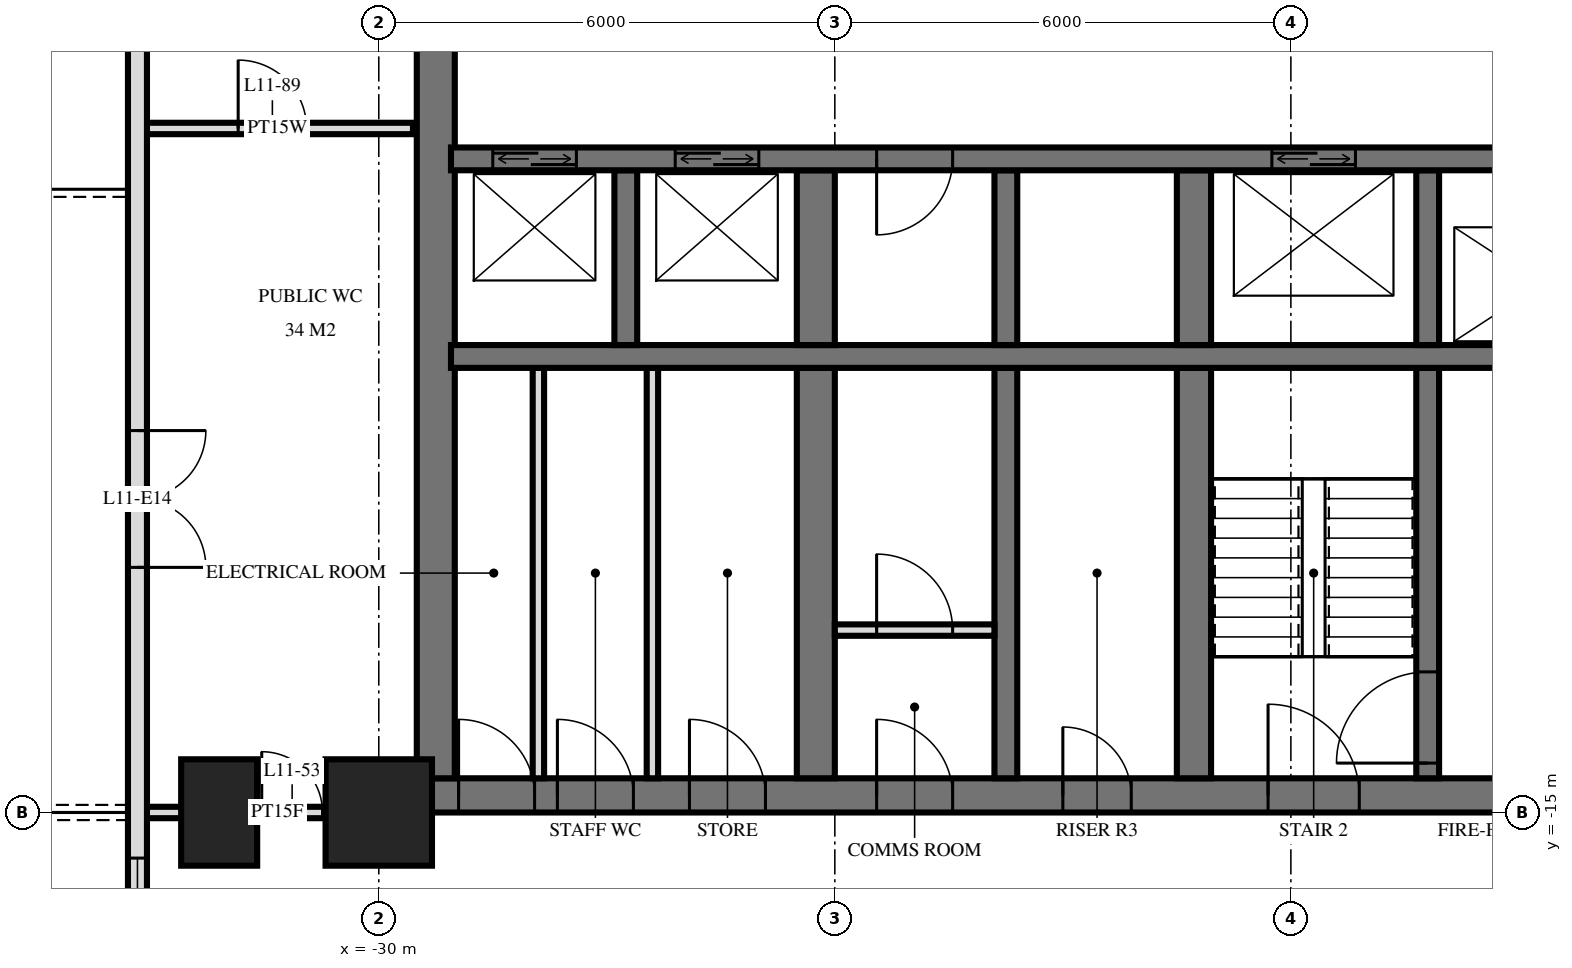
"""IFC4 building model, lengths in metres.
Left out: names, types, materials, properties, quantities, classifications, styles, units other than length and angle.
Written with IfcOpenShell. Run it as: python <this file> out.ifc"""

import sys

from ifc_helpers import new_model, si_unit, direction, frame, frame_2d, origin, origin_2d, place, context, subcontext, project, spatial, rectangle, extrude, element, fill, save


model = new_model("IFC4")
c1 = context("Model", 3, precision=1e-05, world=origin(), true_north=direction((0.0, 1.0)))
c2 = subcontext(c1, "Body", "Model", "MODEL_VIEW")
j1 = project(units=[si_unit("LENGTHUNIT", "METRE"), si_unit("PLANEANGLEUNIT", "RADIAN")], contexts=[c1])
p1 = place(None, origin())
s1 = spatial("IfcSite", under=j1, at=p1, CompositionType="ELEMENT")
p2 = place(p1, origin())
s2 = spatial("IfcBuilding", under=s1, at=p2, CompositionType="ELEMENT")
p3 = place(p2, frame((0.0, 0.0, 49.2)))
s3 = spatial("IfcBuildingStorey", under=s2, at=p3, CompositionType="ELEMENT", Elevation=49.2)
p4 = place(p3, frame((-32.1, -15.0, 0.0), z_axis=(0.0, 0.0, 1.0), x_axis=(0.0, 1.0, 0.0)))
e1 = element("IfcColumn", 1, at=p4, inside=s3, PredefinedType="COLUMN", context=c2, shape_type="SweptSolid", body=[
    extrude(rectangle(XDim=1.4, YDim=1.0, at=origin_2d()), origin(), (0.0, 0.0, 1.0), 3.6),
])
p5 = place(p3, frame((-30.0, -15.0, 0.0), z_axis=(0.0, 0.0, 1.0), x_axis=(1.0, 0.0, 0.0)))
e2 = element("IfcColumn", 2, at=p5, inside=s3, PredefinedType="COLUMN", context=c2, shape_type="SweptSolid", body=[
    extrude(rectangle(XDim=1.4, YDim=1.4, at=origin_2d()), origin(), (0.0, 0.0, 1.0), 3.6),
])
p6 = place(p3, frame((-29.5, -14.775, 0.0), z_axis=(0.0, 0.0, 1.0), x_axis=(1.0, 0.0, 0.0)))
e3 = element("IfcWall", 3, at=p6, inside=s3, PredefinedType="SHEAR", context=c2, shape_type="SweptSolid", body=[
    extrude(rectangle(XDim=19.5, YDim=0.45, at=frame_2d((9.75, 0.0))), origin(), (0.0, 0.0, 1.0), 3.6),
])
p7 = place(p6, frame((11.2, 0.0, 0.0)))
e4 = element("IfcOpeningElement", 4, at=p7, cuts=e3, PredefinedType="OPENING", context=c2, shape_type="SweptSolid", body=[
    extrude(rectangle(XDim=1.2, YDim=2.1, at=frame_2d((0.6, 1.05))), frame((0.0, 0.235, 0.0), z_axis=(0.0, -1.0, 0.0), x_axis=(1.0, 0.0, 0.0)), (0.0, 0.0, 1.0), 0.47),
])
p8 = place(p6, frame((14.25, 0.0, 0.0)))
e5 = element("IfcOpeningElement", 5, at=p8, cuts=e3, PredefinedType="OPENING", context=c2, shape_type="SweptSolid", body=[
    extrude(rectangle(XDim=1.1, YDim=2.1, at=frame_2d((0.55, 1.05))), frame((0.0, 0.235, 0.0), z_axis=(0.0, -1.0, 0.0), x_axis=(1.0, 0.0, 0.0)), (0.0, 0.0, 1.0), 0.47),
])
p9 = place(p6, frame((8.5, 0.0, 0.0)))
e6 = element("IfcOpeningElement", 6, at=p9, cuts=e3, PredefinedType="OPENING", context=c2, shape_type="SweptSolid", body=[
    extrude(rectangle(XDim=0.9, YDim=2.1, at=frame_2d((0.45, 1.05))), frame((0.0, 0.235, 0.0), z_axis=(0.0, -1.0, 0.0), x_axis=(1.0, 0.0, 0.0)), (0.0, 0.0, 1.0), 0.47),
])
p10 = place(p6, frame((6.05, 0.0, 0.0)))
e7 = element("IfcOpeningElement", 7, at=p10, cuts=e3, PredefinedType="OPENING", context=c2, shape_type="SweptSolid", body=[
    extrude(rectangle(XDim=1.0, YDim=2.1, at=frame_2d((0.5, 1.05))), frame((0.0, 0.235, 0.0), z_axis=(0.0, -1.0, 0.0), x_axis=(1.0, 0.0, 0.0)), (0.0, 0.0, 1.0), 0.47),
])
p11 = place(p6, frame((3.587, 0.0, 0.0)))
e8 = element("IfcOpeningElement", 8, at=p11, cuts=e3, PredefinedType="OPENING", context=c2, shape_type="SweptSolid", body=[
    extrude(rectangle(XDim=1.0, YDim=2.1, at=frame_2d((0.5, 1.05))), frame((0.0, 0.235, 0.0), z_axis=(0.0, -1.0, 0.0), x_axis=(1.0, 0.0, 0.0)), (0.0, 0.0, 1.0), 0.47),
])
p12 = place(p6, frame((1.85, 0.0, 0.0)))
e9 = element("IfcOpeningElement", 9, at=p12, cuts=e3, PredefinedType="OPENING", context=c2, shape_type="SweptSolid", body=[
    extrude(rectangle(XDim=1.0, YDim=2.1, at=frame_2d((0.5, 1.05))), frame((0.0, 0.235, 0.0), z_axis=(0.0, -1.0, 0.0), x_axis=(1.0, 0.0, 0.0)), (0.0, 0.0, 1.0), 0.47),
])
p13 = place(p6, frame((0.55, 0.0, 0.0)))
e10 = element("IfcOpeningElement", 10, at=p13, cuts=e3, PredefinedType="OPENING", context=c2, shape_type="SweptSolid", body=[
    extrude(rectangle(XDim=1.0, YDim=2.1, at=frame_2d((0.5, 1.05))), frame((0.0, 0.235, 0.0), z_axis=(0.0, -1.0, 0.0), x_axis=(1.0, 0.0, 0.0)), (0.0, 0.0, 1.0), 0.47),
])
p14 = place(p3, frame((-29.25, -14.55, 0.0), z_axis=(0.0, 0.0, 1.0), x_axis=(0.0, 1.0, 0.0)))
e11 = element("IfcWall", 11, at=p14, inside=s3, PredefinedType="SHEAR", context=c2, shape_type="SweptSolid", body=[
    extrude(rectangle(XDim=14.1, YDim=0.5, at=frame_2d((7.05, 0.0))), origin(), (0.0, 0.0, 1.0), 3.6),
])
p15 = place(p3, frame((-29.05, -6.4, 0.0), z_axis=(0.0, 0.0, 1.0), x_axis=(1.0, 0.0, 0.0)))
e12 = element("IfcWall", 12, at=p15, inside=s3, PredefinedType="SHEAR", context=c2, shape_type="SweptSolid", body=[
    extrude(rectangle(XDim=18.7, YDim=0.3, at=frame_2d((9.35, 0.0))), origin(), (0.0, 0.0, 1.0), 3.6),
])
p16 = place(p15, frame((2.95, 0.0, 0.0)))
e13 = element("IfcOpeningElement", 13, at=p16, cuts=e12, PredefinedType="OPENING", context=c2, shape_type="SweptSolid", body=[
    extrude(rectangle(XDim=1.1, YDim=2.1, at=frame_2d((0.55, 1.05))), frame((0.0, 0.16, 0.0), z_axis=(0.0, -1.0, 0.0), x_axis=(1.0, 0.0, 0.0)), (0.0, 0.0, 1.0), 0.32),
])
p17 = place(p15, frame((0.55, 0.0, 0.0)))
e14 = element("IfcOpeningElement", 14, at=p17, cuts=e12, PredefinedType="OPENING", context=c2, shape_type="SweptSolid", body=[
    extrude(rectangle(XDim=1.1, YDim=2.1, at=frame_2d((0.55, 1.05))), frame((0.0, 0.16, 0.0), z_axis=(0.0, -1.0, 0.0), x_axis=(1.0, 0.0, 0.0)), (0.0, 0.0, 1.0), 0.32),
])
p18 = place(p15, frame((10.8, 0.0, 0.0)))
e15 = element("IfcOpeningElement", 15, at=p18, cuts=e12, PredefinedType="OPENING", context=c2, shape_type="SweptSolid", body=[
    extrude(rectangle(XDim=1.1, YDim=2.1, at=frame_2d((0.55, 1.05))), frame((0.0, 0.16, 0.0), z_axis=(0.0, -1.0, 0.0), x_axis=(1.0, 0.0, 0.0)), (0.0, 0.0, 1.0), 0.32),
])
p19 = place(p15, frame((5.6, 0.0, 0.0)))
e16 = element("IfcOpeningElement", 16, at=p19, cuts=e12, PredefinedType="OPENING", context=c2, shape_type="SweptSolid", body=[
    extrude(rectangle(XDim=1.0, YDim=2.1, at=frame_2d((0.5, 1.05))), frame((0.0, 0.16, 0.0), z_axis=(0.0, -1.0, 0.0), x_axis=(1.0, 0.0, 0.0)), (0.0, 0.0, 1.0), 0.32),
])
p20 = place(p3, frame((-29.05, -9.0, 0.0), z_axis=(0.0, 0.0, 1.0), x_axis=(1.0, 0.0, 0.0)))
e17 = element("IfcWall", 17, at=p20, inside=s3, PredefinedType="SHEAR", context=c2, shape_type="SweptSolid", body=[
    extrude(rectangle(XDim=18.7, YDim=0.3, at=frame_2d((9.35, 0.0))), origin(), (0.0, 0.0, 1.0), 3.6),
])
p21 = place(p20, frame((13.8, 0.0, 0.0)))
e18 = element("IfcOpeningElement", 18, at=p21, cuts=e17, PredefinedType="OPENING", context=c2, shape_type="SweptSolid", body=[
    extrude(rectangle(XDim=1.1, YDim=2.1, at=frame_2d((0.55, 1.05))), frame((0.0, 0.16, 0.0), z_axis=(0.0, -1.0, 0.0), x_axis=(1.0, 0.0, 0.0)), (0.0, 0.0, 1.0), 0.32),
])
p22 = place(p3, frame((-16.2, -8.85, 0.0), z_axis=(0.0, 0.0, 1.0), x_axis=(0.0, 1.0, 0.0)))
e19 = element("IfcWall", 19, at=p22, inside=s3, PredefinedType="SHEAR", context=c2, shape_type="SweptSolid", body=[
    extrude(rectangle(XDim=2.3, YDim=0.3, at=frame_2d((1.15, 0.0))), origin(), (0.0, 0.0, 1.0), 3.6),
])
p23 = place(p3, frame((-16.2, -14.55, 0.0), z_axis=(0.0, 0.0, 1.0), x_axis=(0.0, 1.0, 0.0)))
e20 = element("IfcWall", 20, at=p23, inside=s3, PredefinedType="SHEAR", context=c2, shape_type="SweptSolid", body=[
    extrude(rectangle(XDim=5.4, YDim=0.3, at=frame_2d((2.7, 0.0))), origin(), (0.0, 0.0, 1.0), 3.6),
])
p24 = place(p23, frame((0.2, 0.0, 0.0)))
e21 = element("IfcOpeningElement", 21, at=p24, cuts=e20, PredefinedType="OPENING", context=c2, shape_type="SweptSolid", body=[
    extrude(rectangle(XDim=1.2, YDim=2.1, at=frame_2d((0.6, 1.05))), frame((0.0, 0.16, 0.0), z_axis=(0.0, -1.0, 0.0), x_axis=(1.0, 0.0, 0.0)), (0.0, 0.0, 1.0), 0.32),
])
p25 = place(p3, frame((-19.275, -8.85, 0.0), z_axis=(0.0, 0.0, 1.0), x_axis=(0.0, 1.0, 0.0)))
e22 = element("IfcWall", 22, at=p25, inside=s3, PredefinedType="SHEAR", context=c2, shape_type="SweptSolid", body=[
    extrude(rectangle(XDim=2.3, YDim=0.45, at=frame_2d((1.15, 0.0))), origin(), (0.0, 0.0, 1.0), 3.6),
])
p26 = place(p3, frame((-19.275, -14.55, 0.0), z_axis=(0.0, 0.0, 1.0), x_axis=(0.0, 1.0, 0.0)))
e23 = element("IfcWall", 23, at=p26, inside=s3, PredefinedType="SHEAR", context=c2, shape_type="SweptSolid", body=[
    extrude(rectangle(XDim=5.4, YDim=0.45, at=frame_2d((2.7, 0.0))), origin(), (0.0, 0.0, 1.0), 3.6),
])
p27 = place(p3, frame((-21.75, -8.85, 0.0), z_axis=(0.0, 0.0, 1.0), x_axis=(0.0, 1.0, 0.0)))
e24 = element("IfcWall", 24, at=p27, inside=s3, PredefinedType="SHEAR", context=c2, shape_type="SweptSolid", body=[
    extrude(rectangle(XDim=2.3, YDim=0.3, at=frame_2d((1.15, 0.0))), origin(), (0.0, 0.0, 1.0), 3.6),
])
p28 = place(p3, frame((-21.75, -14.55, 0.0), z_axis=(0.0, 0.0, 1.0), x_axis=(0.0, 1.0, 0.0)))
e25 = element("IfcWall", 25, at=p28, inside=s3, PredefinedType="SHEAR", context=c2, shape_type="SweptSolid", body=[
    extrude(rectangle(XDim=5.4, YDim=0.3, at=frame_2d((2.7, 0.0))), origin(), (0.0, 0.0, 1.0), 3.6),
])
p29 = place(p3, frame((-24.25, -8.85, 0.0), z_axis=(0.0, 0.0, 1.0), x_axis=(0.0, 1.0, 0.0)))
e26 = element("IfcWall", 26, at=p29, inside=s3, PredefinedType="SHEAR", context=c2, shape_type="SweptSolid", body=[
    extrude(rectangle(XDim=2.3, YDim=0.5, at=frame_2d((1.15, 0.0))), origin(), (0.0, 0.0, 1.0), 3.6),
])
p30 = place(p3, frame((-24.25, -14.55, 0.0), z_axis=(0.0, 0.0, 1.0), x_axis=(0.0, 1.0, 0.0)))
e27 = element("IfcWall", 27, at=p30, inside=s3, PredefinedType="SHEAR", context=c2, shape_type="SweptSolid", body=[
    extrude(rectangle(XDim=5.4, YDim=0.5, at=frame_2d((2.7, 0.0))), origin(), (0.0, 0.0, 1.0), 3.6),
])
p31 = place(p3, frame((-26.75, -8.85, 0.0), z_axis=(0.0, 0.0, 1.0), x_axis=(0.0, 1.0, 0.0)))
e28 = element("IfcWall", 28, at=p31, inside=s3, PredefinedType="SHEAR", context=c2, shape_type="SweptSolid", body=[
    extrude(rectangle(XDim=2.3, YDim=0.3, at=frame_2d((1.15, 0.0))), origin(), (0.0, 0.0, 1.0), 3.6),
])
p32 = place(p3, frame((-33.175, -3.325, 0.0), z_axis=(0.0, 0.0, 1.0), x_axis=(0.0, -1.0, 0.0)))
e29 = element("IfcWall", 29, at=p32, inside=s3, PredefinedType="SOLIDWALL", context=c2, shape_type="SweptSolid", body=[
    extrude(rectangle(XDim=21.551, YDim=0.25, at=frame_2d((10.775, 0.0))), origin(), (0.0, 0.0, 1.0), 3.32),
])
p33 = place(p32, frame((6.65, 0.0, 0.0)))
e30 = element("IfcOpeningElement", 30, at=p33, cuts=e29, PredefinedType="OPENING", context=c2, shape_type="SweptSolid", body=[
    extrude(rectangle(XDim=1.8, YDim=2.4, at=frame_2d((0.9, 1.2))), frame((0.0, 0.135, 0.0), z_axis=(0.0, -1.0, 0.0), x_axis=(1.0, 0.0, 0.0)), (0.0, 0.0, 1.0), 0.27),
])
p34 = place(p32, frame((12.275, 0.0, 0.3)))
e31 = element("IfcOpeningElement", 31, at=p34, cuts=e29, PredefinedType="OPENING", context=c2, shape_type="SweptSolid", body=[
    extrude(rectangle(XDim=1.2, YDim=2.1, at=frame_2d((0.6, 1.05))), frame((0.0, 0.135, 0.0), z_axis=(0.0, -1.0, 0.0), x_axis=(1.0, 0.0, 0.0)), (0.0, 0.0, 1.0), 0.27),
])
p35 = place(p32, frame((14.675, 0.0, 0.0)))
e32 = element("IfcOpeningElement", 32, at=p35, cuts=e29, PredefinedType="OPENING", context=c2, shape_type="SweptSolid", body=[
    extrude(rectangle(XDim=1.8, YDim=2.4, at=frame_2d((0.9, 1.2))), frame((0.0, 0.135, 0.0), z_axis=(0.0, -1.0, 0.0), x_axis=(1.0, 0.0, 0.0)), (0.0, 0.0, 1.0), 0.27),
])
p36 = place(p32, frame((18.875, 0.0, 0.0)))
e33 = element("IfcOpeningElement", 33, at=p36, cuts=e29, PredefinedType="OPENING", context=c2, shape_type="SweptSolid", body=[
    extrude(rectangle(XDim=1.8, YDim=2.4, at=frame_2d((0.9, 1.2))), frame((0.0, 0.135, 0.0), z_axis=(0.0, -1.0, 0.0), x_axis=(1.0, 0.0, 0.0)), (0.0, 0.0, 1.0), 0.27),
])
p37 = place(p3, frame((-24.0, -12.6, 0.0), z_axis=(0.0, 0.0, 1.0), x_axis=(1.0, 0.0, 0.0)))
e34 = element("IfcWall", 34, at=p37, inside=s3, PredefinedType="PARTITIONING", context=c2, shape_type="SweptSolid", body=[
    extrude(rectangle(XDim=2.1, YDim=0.15, at=frame_2d((1.05, 0.0))), origin(), (0.0, 0.0, 1.0), 3.3),
])
p38 = place(p37, frame((0.55, 0.0, 0.0)))
e35 = element("IfcOpeningElement", 35, at=p38, cuts=e34, PredefinedType="OPENING", context=c2, shape_type="SweptSolid", body=[
    extrude(rectangle(XDim=1.0, YDim=2.1, at=frame_2d((0.5, 1.05))), frame((0.0, 0.085, 0.0), z_axis=(0.0, -1.0, 0.0), x_axis=(1.0, 0.0, 0.0)), (0.0, 0.0, 1.0), 0.17),
])
for number, where, z_axis, x_axis in (
    (36, (-26.4, -14.55, 0.0), (0.0, 0.0, 1.0), (0.0, 1.0, 0.0)),
    (37, (-27.9, -14.55, 0.0), (0.0, 0.0, 1.0), (0.0, 1.0, 0.0)),
):
    element("IfcWall", number, at=place(p3, frame(where, z_axis=z_axis, x_axis=x_axis)), inside=s3, PredefinedType="PARTITIONING", context=c2, shape_type="SweptSolid", body=[
        extrude(rectangle(XDim=5.4, YDim=0.15, at=frame_2d((2.7, 0.0))), origin(), (0.0, 0.0, 1.0), 3.3),
    ])
p39 = place(p3, frame((-33.12, -15.0, 0.0), z_axis=(0.0, 0.0, 1.0), x_axis=(1.0, 0.0, 0.0)))
e38 = element("IfcWall", 38, at=p39, inside=s3, PredefinedType="PARTITIONING", context=c2, shape_type="SweptSolid", body=[
    extrude(rectangle(XDim=3.57, YDim=0.15, at=frame_2d((1.785, 0.0))), origin(), (0.0, 0.0, 1.0), 3.32),
])
p40 = place(p39, frame((1.58, 0.0, 0.0)))
e39 = element("IfcOpeningElement", 39, at=p40, cuts=e38, PredefinedType="OPENING", context=c2, shape_type="SweptSolid", body=[
    extrude(rectangle(XDim=0.8, YDim=2.1, at=frame_2d((0.4, 1.05))), frame((0.0, 0.085, 0.0), z_axis=(0.0, -1.0, 0.0), x_axis=(1.0, 0.0, 0.0)), (0.0, 0.0, 1.0), 0.17),
])
p41 = place(p3, frame((-33.12, -6.0, 0.0), z_axis=(0.0, 0.0, 1.0), x_axis=(1.0, 0.0, 0.0)))
e40 = element("IfcWall", 40, at=p41, inside=s3, PredefinedType="PLUMBINGWALL", context=c2, shape_type="SweptSolid", body=[
    extrude(rectangle(XDim=3.57, YDim=0.15, at=frame_2d((1.785, 0.0))), origin(), (0.0, 0.0, 1.0), 3.32),
])
p42 = place(p41, frame((1.27, 0.0, 0.0)))
e41 = element("IfcOpeningElement", 41, at=p42, cuts=e40, PredefinedType="OPENING", context=c2, shape_type="SweptSolid", body=[
    extrude(rectangle(XDim=0.9, YDim=2.1, at=frame_2d((0.45, 1.05))), frame((0.0, 0.085, 0.0), z_axis=(0.0, -1.0, 0.0), x_axis=(1.0, 0.0, 0.0)), (0.0, 0.0, 1.0), 0.17),
])
p43 = place(p33, origin())
e42 = element("IfcDoor", 42, at=p43, inside=s3, OperationType="DOUBLE_DOOR_SINGLE_SWING", PredefinedType="DOOR", context=c2, shape_type="SweptSolid", body=[
    extrude(rectangle(XDim=1.8, YDim=2.4, at=frame_2d((0.9, 1.2))), frame((0.0, 0.025, 0.0), z_axis=(0.0, -1.0, 0.0), x_axis=(1.0, 0.0, 0.0)), (0.0, 0.0, 1.0), 0.05),
])
fill(e30, e42)
p44 = place(p34, origin())
e43 = element("IfcWindow", 43, at=p44, inside=s3, PartitioningType="SINGLE_PANEL", PredefinedType="WINDOW", context=c2, shape_type="SweptSolid", body=[
    extrude(rectangle(XDim=1.2, YDim=2.1, at=frame_2d((0.6, 1.05))), frame((0.0, 0.03, 0.0), z_axis=(0.0, -1.0, 0.0), x_axis=(1.0, 0.0, 0.0)), (0.0, 0.0, 1.0), 0.06),
])
fill(e31, e43)
p45 = place(p16, origin())
e44 = element("IfcDoor", 44, at=p45, inside=s3, OperationType="DOUBLE_DOOR_SLIDING", PredefinedType="USERDEFINED", context=c2, shape_type="SweptSolid", body=[
    extrude(rectangle(XDim=1.1, YDim=2.1, at=frame_2d((0.55, 1.05))), frame((0.0, 0.025, 0.0), z_axis=(0.0, -1.0, 0.0), x_axis=(1.0, 0.0, 0.0)), (0.0, 0.0, 1.0), 0.05),
])
fill(e13, e44)
p46 = place(p17, origin())
e45 = element("IfcDoor", 45, at=p46, inside=s3, OperationType="DOUBLE_DOOR_SLIDING", PredefinedType="USERDEFINED", context=c2, shape_type="SweptSolid", body=[
    extrude(rectangle(XDim=1.1, YDim=2.1, at=frame_2d((0.55, 1.05))), frame((0.0, 0.025, 0.0), z_axis=(0.0, -1.0, 0.0), x_axis=(1.0, 0.0, 0.0)), (0.0, 0.0, 1.0), 0.05),
])
fill(e14, e45)
p47 = place(p18, origin())
e46 = element("IfcDoor", 46, at=p47, inside=s3, OperationType="DOUBLE_DOOR_SLIDING", PredefinedType="USERDEFINED", context=c2, shape_type="SweptSolid", body=[
    extrude(rectangle(XDim=1.1, YDim=2.1, at=frame_2d((0.55, 1.05))), frame((0.0, 0.025, 0.0), z_axis=(0.0, -1.0, 0.0), x_axis=(1.0, 0.0, 0.0)), (0.0, 0.0, 1.0), 0.05),
])
fill(e15, e46)
p48 = place(p7, origin())
e47 = element("IfcDoor", 47, at=p48, inside=s3, OperationType="SINGLE_SWING_RIGHT", PredefinedType="DOOR", context=c2, shape_type="SweptSolid", body=[
    extrude(rectangle(XDim=1.2, YDim=2.1, at=frame_2d((0.6, 1.05))), frame((0.0, 0.025, 0.0), z_axis=(0.0, -1.0, 0.0), x_axis=(1.0, 0.0, 0.0)), (0.0, 0.0, 1.0), 0.05),
])
fill(e4, e47)
p49 = place(p9, origin())
e48 = element("IfcDoor", 48, at=p49, inside=s3, OperationType="SINGLE_SWING_RIGHT", PredefinedType="DOOR", context=c2, shape_type="SweptSolid", body=[
    extrude(rectangle(XDim=0.9, YDim=2.1, at=frame_2d((0.45, 1.05))), frame((0.0, 0.025, 0.0), z_axis=(0.0, -1.0, 0.0), x_axis=(1.0, 0.0, 0.0)), (0.0, 0.0, 1.0), 0.05),
])
fill(e6, e48)
p50 = place(p10, origin())
e49 = element("IfcDoor", 49, at=p50, inside=s3, OperationType="SINGLE_SWING_RIGHT", PredefinedType="DOOR", context=c2, shape_type="SweptSolid", body=[
    extrude(rectangle(XDim=1.0, YDim=2.1, at=frame_2d((0.5, 1.05))), frame((0.0, 0.025, 0.0), z_axis=(0.0, -1.0, 0.0), x_axis=(1.0, 0.0, 0.0)), (0.0, 0.0, 1.0), 0.05),
])
fill(e7, e49)
p51 = place(p11, origin())
e50 = element("IfcDoor", 50, at=p51, inside=s3, OperationType="SINGLE_SWING_RIGHT", PredefinedType="DOOR", context=c2, shape_type="SweptSolid", body=[
    extrude(rectangle(XDim=1.0, YDim=2.1, at=frame_2d((0.5, 1.05))), frame((0.0, 0.025, 0.0), z_axis=(0.0, -1.0, 0.0), x_axis=(1.0, 0.0, 0.0)), (0.0, 0.0, 1.0), 0.05),
])
fill(e8, e50)
p52 = place(p12, origin())
e51 = element("IfcDoor", 51, at=p52, inside=s3, OperationType="SINGLE_SWING_RIGHT", PredefinedType="DOOR", context=c2, shape_type="SweptSolid", body=[
    extrude(rectangle(XDim=1.0, YDim=2.1, at=frame_2d((0.5, 1.05))), frame((0.0, 0.025, 0.0), z_axis=(0.0, -1.0, 0.0), x_axis=(1.0, 0.0, 0.0)), (0.0, 0.0, 1.0), 0.05),
])
fill(e9, e51)
p53 = place(p13, origin())
e52 = element("IfcDoor", 52, at=p53, inside=s3, OperationType="SINGLE_SWING_RIGHT", PredefinedType="DOOR", context=c2, shape_type="SweptSolid", body=[
    extrude(rectangle(XDim=1.0, YDim=2.1, at=frame_2d((0.5, 1.05))), frame((0.0, 0.025, 0.0), z_axis=(0.0, -1.0, 0.0), x_axis=(1.0, 0.0, 0.0)), (0.0, 0.0, 1.0), 0.05),
])
fill(e10, e52)
p54 = place(p19, frame((0.5, 0.0, 0.0), z_axis=(0.0, 0.0, 1.0), x_axis=(-1.0, 0.0, 0.0)))
e53 = element("IfcDoor", 53, at=p54, inside=s3, OperationType="SINGLE_SWING_LEFT", PredefinedType="DOOR", context=c2, shape_type="SweptSolid", body=[
    extrude(rectangle(XDim=1.0, YDim=2.1, at=frame_2d((0.0, 1.05))), frame((0.0, -0.025, 0.0), z_axis=(0.0, 1.0, 0.0), x_axis=(-1.0, 0.0, 0.0)), (0.0, 0.0, 1.0), 0.05),
])
fill(e16, e53)
p55 = place(p24, origin())
e54 = element("IfcDoor", 54, at=p55, inside=s3, OperationType="SINGLE_SWING_RIGHT", PredefinedType="DOOR", context=c2, shape_type="SweptSolid", body=[
    extrude(rectangle(XDim=1.2, YDim=2.1, at=frame_2d((0.6, 1.05))), frame((0.0, 0.025, 0.0), z_axis=(0.0, -1.0, 0.0), x_axis=(1.0, 0.0, 0.0)), (0.0, 0.0, 1.0), 0.05),
])
fill(e21, e54)
p56 = place(p38, origin())
e55 = element("IfcDoor", 55, at=p56, inside=s3, OperationType="SINGLE_SWING_RIGHT", PredefinedType="DOOR", context=c2, shape_type="SweptSolid", body=[
    extrude(rectangle(XDim=1.0, YDim=2.1, at=frame_2d((0.5, 1.05))), frame((0.0, 0.025, 0.0), z_axis=(0.0, -1.0, 0.0), x_axis=(1.0, 0.0, 0.0)), (0.0, 0.0, 1.0), 0.05),
])
fill(e35, e55)
p57 = place(p40, origin())
e56 = element("IfcDoor", 56, at=p57, inside=s3, OperationType="SINGLE_SWING_RIGHT", PredefinedType="DOOR", context=c2, shape_type="SweptSolid", body=[
    extrude(rectangle(XDim=0.8, YDim=2.1, at=frame_2d((0.4, 1.05))), frame((0.0, 0.025, 0.0), z_axis=(0.0, -1.0, 0.0), x_axis=(1.0, 0.0, 0.0)), (0.0, 0.0, 1.0), 0.05),
])
fill(e39, e56)
p58 = place(p42, origin())
e57 = element("IfcDoor", 57, at=p58, inside=s3, OperationType="SINGLE_SWING_RIGHT", PredefinedType="DOOR", context=c2, shape_type="SweptSolid", body=[
    extrude(rectangle(XDim=0.9, YDim=2.1, at=frame_2d((0.45, 1.05))), frame((0.0, 0.025, 0.0), z_axis=(0.0, -1.0, 0.0), x_axis=(1.0, 0.0, 0.0)), (0.0, 0.0, 1.0), 0.05),
])
fill(e41, e57)
save(model, sys.argv[1])
